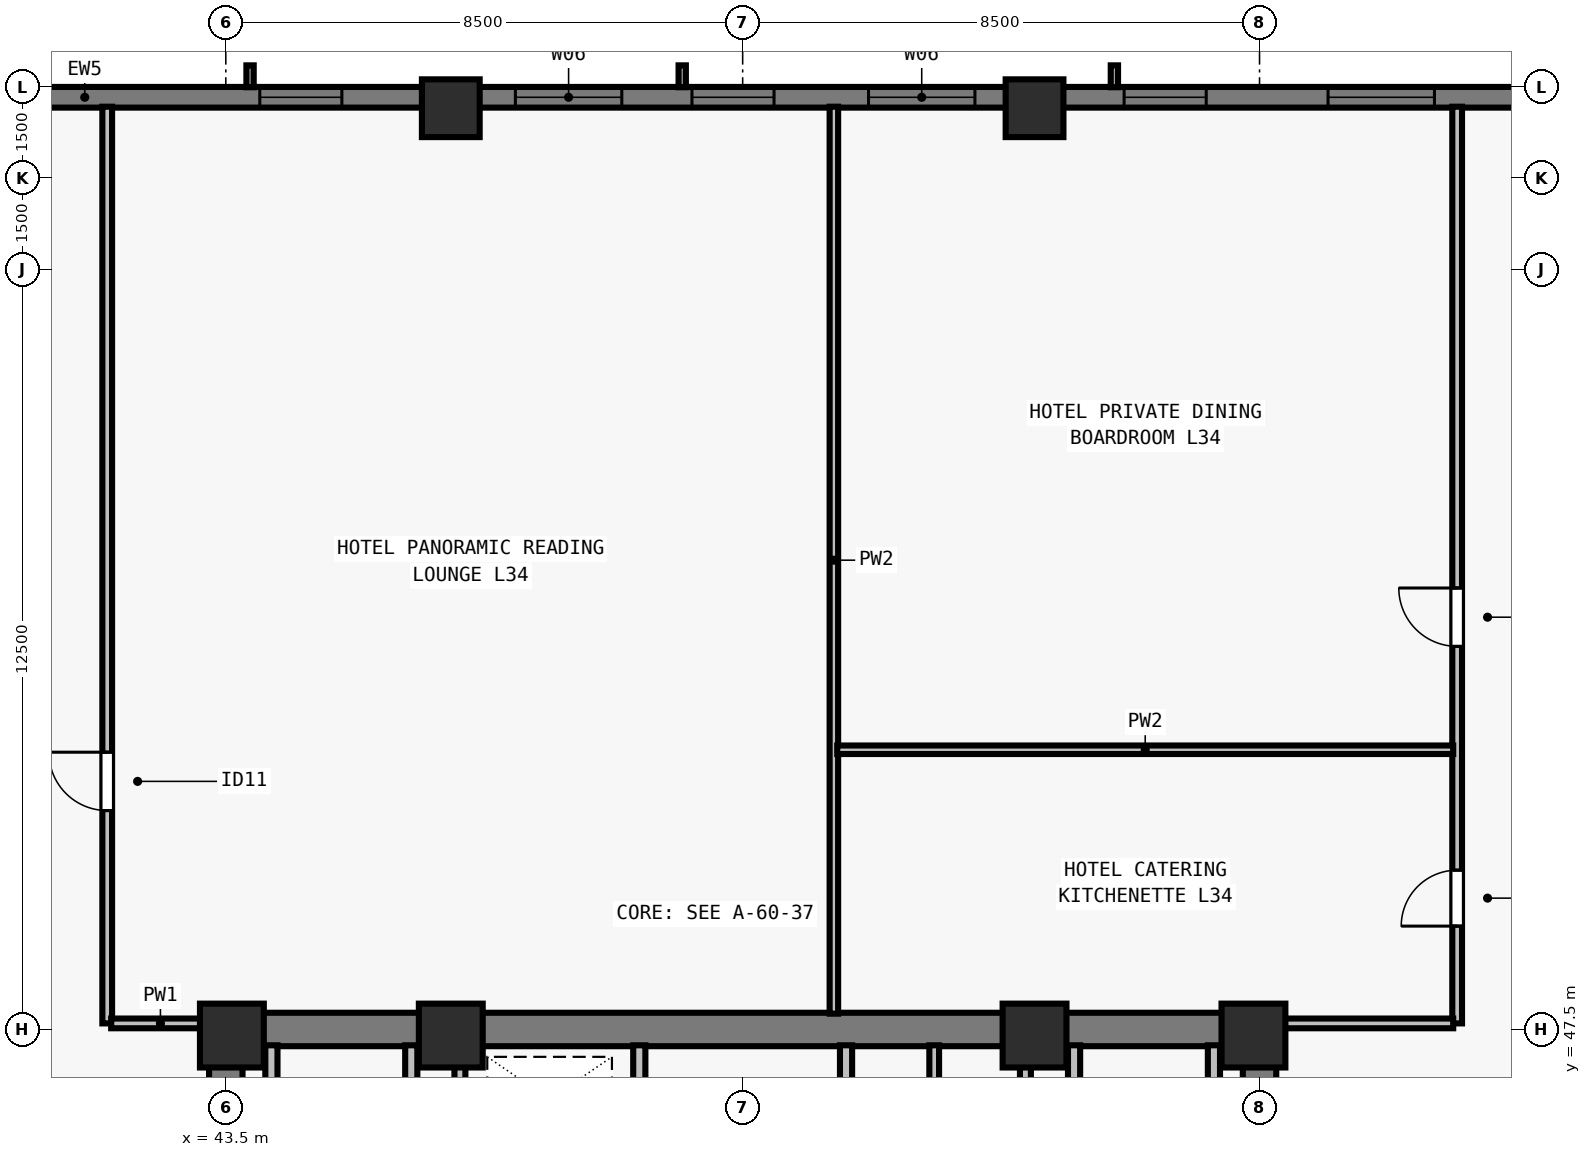
"""IFC4 building model, lengths in metres.
Left out: names, types, materials, properties, quantities, classifications, styles, units other than length and angle.
Written with IfcOpenShell. Run it as: python <this file> out.ifc"""

import sys

from ifc_helpers import new_model, si_unit, direction, frame, frame_2d, origin, origin_2d, place, context, subcontext, project, spatial, rectangle, extrude, element, fill, save


model = new_model("IFC4")
c1 = context("Model", 3, precision=1e-05, world=origin(), true_north=direction((0.0, 1.0)))
c2 = subcontext(c1, "Body", "Model", "MODEL_VIEW")
j1 = project(units=[si_unit("LENGTHUNIT", "METRE"), si_unit("PLANEANGLEUNIT", "RADIAN")], contexts=[c1])
p1 = place(None, origin())
s1 = spatial("IfcSite", under=j1, at=p1, CompositionType="ELEMENT")
p2 = place(p1, origin())
s2 = spatial("IfcBuilding", under=s1, at=p2, CompositionType="ELEMENT")
p3 = place(p2, frame((0.0, 0.0, 127.0)))
s3 = spatial("IfcBuildingStorey", under=s2, at=p3, CompositionType="ELEMENT", Elevation=127.0)
for number, where, z_axis, x_axis in (
    (1, (43.6, 47.4, 0.0), (0.0, 0.0, 1.0), (1.0, 0.0, 0.0)),
    (2, (47.2, 47.4, 0.0), (0.0, 0.0, 1.0), (1.0, 0.0, 0.0)),
    (3, (56.8, 47.4, 0.0), (0.0, 0.0, 1.0), (1.0, 0.0, 0.0)),
    (4, (60.4, 47.4, 0.0), (0.0, 0.0, 1.0), (1.0, 0.0, 0.0)),
):
    element("IfcColumn", number, at=place(p3, frame(where, z_axis=z_axis, x_axis=x_axis)), inside=s3, PredefinedType="COLUMN", context=c2, shape_type="SweptSolid", body=[
        extrude(rectangle(XDim=1.05, YDim=1.05, at=origin_2d()), origin(), (0.0, 0.0, 1.0), 3.5),
    ])
for number, where, z_axis, x_axis in (
    (5, (56.8, 62.65, 0.0), (0.0, 0.0, 1.0), (1.0, 0.0, 0.0)),
    (6, (47.2, 62.65, 0.0), (0.0, 0.0, 1.0), (1.0, 0.0, 0.0)),
):
    element("IfcColumn", number, at=place(p3, frame(where, z_axis=z_axis, x_axis=x_axis)), inside=s3, PredefinedType="COLUMN", context=c2, shape_type="SweptSolid", body=[
        extrude(rectangle(XDim=0.95, YDim=0.95, at=origin_2d()), origin(), (0.0, 0.0, 1.0), 3.5),
    ])
p4 = place(p3, frame((32.0, 62.83, 0.0), z_axis=(0.0, 0.0, 1.0), x_axis=(1.0, 0.0, 0.0)))
e7 = element("IfcWall", 7, at=p4, inside=s3, PredefinedType="SOLIDWALL", context=c2, shape_type="SweptSolid", body=[
    extrude(rectangle(XDim=39.682, YDim=0.34, at=frame_2d((19.841, 0.0))), origin(), (0.0, 0.0, 1.0), 3.28),
])
p5 = place(p4, frame((4.952, 0.0, 0.8)))
e8 = element("IfcOpeningElement", 8, at=p5, cuts=e7, PredefinedType="OPENING", context=c2, shape_type="SweptSolid", body=[
    extrude(rectangle(XDim=1.35, YDim=1.66, at=frame_2d((0.675, 0.83))), frame((0.0, 0.18, 0.0), z_axis=(0.0, -1.0, 0.0), x_axis=(1.0, 0.0, 0.0)), (0.0, 0.0, 1.0), 0.36),
])
p6 = place(p4, frame((12.059, 0.0, 0.8)))
e9 = element("IfcOpeningElement", 9, at=p6, cuts=e7, PredefinedType="OPENING", context=c2, shape_type="SweptSolid", body=[
    extrude(rectangle(XDim=1.35, YDim=1.66, at=frame_2d((0.675, 0.83))), frame((0.0, 0.18, 0.0), z_axis=(0.0, -1.0, 0.0), x_axis=(1.0, 0.0, 0.0)), (0.0, 0.0, 1.0), 0.36),
])
p7 = place(p4, frame((16.262, 0.0, 0.8)))
e10 = element("IfcOpeningElement", 10, at=p7, cuts=e7, PredefinedType="OPENING", context=c2, shape_type="SweptSolid", body=[
    extrude(rectangle(XDim=1.75, YDim=1.66, at=frame_2d((0.875, 0.83))), frame((0.0, 0.18, 0.0), z_axis=(0.0, -1.0, 0.0), x_axis=(1.0, 0.0, 0.0)), (0.0, 0.0, 1.0), 0.36),
])
p8 = place(p4, frame((19.166, 0.0, 0.8)))
e11 = element("IfcOpeningElement", 11, at=p8, cuts=e7, PredefinedType="OPENING", context=c2, shape_type="SweptSolid", body=[
    extrude(rectangle(XDim=1.35, YDim=1.66, at=frame_2d((0.675, 0.83))), frame((0.0, 0.18, 0.0), z_axis=(0.0, -1.0, 0.0), x_axis=(1.0, 0.0, 0.0)), (0.0, 0.0, 1.0), 0.36),
])
p9 = place(p4, frame((22.07, 0.0, 0.8)))
e12 = element("IfcOpeningElement", 12, at=p9, cuts=e7, PredefinedType="OPENING", context=c2, shape_type="SweptSolid", body=[
    extrude(rectangle(XDim=1.75, YDim=1.66, at=frame_2d((0.875, 0.83))), frame((0.0, 0.18, 0.0), z_axis=(0.0, -1.0, 0.0), x_axis=(1.0, 0.0, 0.0)), (0.0, 0.0, 1.0), 0.36),
])
p10 = place(p4, frame((26.273, 0.0, 0.8)))
e13 = element("IfcOpeningElement", 13, at=p10, cuts=e7, PredefinedType="OPENING", context=c2, shape_type="SweptSolid", body=[
    extrude(rectangle(XDim=1.35, YDim=1.66, at=frame_2d((0.675, 0.83))), frame((0.0, 0.18, 0.0), z_axis=(0.0, -1.0, 0.0), x_axis=(1.0, 0.0, 0.0)), (0.0, 0.0, 1.0), 0.36),
])
p11 = place(p4, frame((29.627, 0.0, 0.8)))
e14 = element("IfcOpeningElement", 14, at=p11, cuts=e7, PredefinedType="OPENING", context=c2, shape_type="SweptSolid", body=[
    extrude(rectangle(XDim=1.75, YDim=1.66, at=frame_2d((0.875, 0.83))), frame((0.0, 0.18, 0.0), z_axis=(0.0, -1.0, 0.0), x_axis=(1.0, 0.0, 0.0)), (0.0, 0.0, 1.0), 0.36),
])
p12 = place(p4, frame((34.23, 0.0, 0.8)))
e15 = element("IfcOpeningElement", 15, at=p12, cuts=e7, PredefinedType="OPENING", context=c2, shape_type="SweptSolid", body=[
    extrude(rectangle(XDim=1.35, YDim=1.66, at=frame_2d((0.675, 0.83))), frame((0.0, 0.18, 0.0), z_axis=(0.0, -1.0, 0.0), x_axis=(1.0, 0.0, 0.0)), (0.0, 0.0, 1.0), 0.36),
])
p13 = place(p3, frame((43.225, 47.5, 0.0), z_axis=(0.0, 0.0, 1.0), x_axis=(1.0, 0.0, 0.0)))
e16 = element("IfcWall", 16, at=p13, inside=s3, PredefinedType="SHEAR", context=c2, shape_type="SweptSolid", body=[
    extrude(rectangle(XDim=17.55, YDim=0.55, at=frame_2d((8.775, 0.0))), origin(), (0.0, 0.0, 1.0), 3.28),
])
for number, where, z_axis, x_axis in (
    (17, (43.5, 40.8, 0.0), (0.0, 0.0, 1.0), (0.0, 1.0, 0.0)),
    (18, (60.5, 40.8, 0.0), (0.0, 0.0, 1.0), (0.0, 1.0, 0.0)),
):
    element("IfcWall", number, at=place(p3, frame(where, z_axis=z_axis, x_axis=x_axis)), inside=s3, PredefinedType="SHEAR", context=c2, shape_type="SweptSolid", body=[
        extrude(rectangle(XDim=6.435, YDim=0.55, at=frame_2d((3.218, 0.0))), origin(), (0.0, 0.0, 1.0), 3.28),
    ])
p14 = place(p3, frame((50.3, 40.585, 0.0), z_axis=(0.0, 0.0, 1.0), x_axis=(0.0, 1.0, 0.0)))
e19 = element("IfcWall", 19, at=p14, inside=s3, PredefinedType="SOLIDWALL", context=c2, shape_type="SweptSolid", body=[
    extrude(rectangle(XDim=6.655, YDim=0.2, at=frame_2d((3.328, 0.0))), origin(), (0.0, 0.0, 1.0), 3.28),
])
p15 = place(p14, frame((5.065, 0.0, 0.0)))
e20 = element("IfcOpeningElement", 20, at=p15, cuts=e19, PredefinedType="OPENING", context=c2, shape_type="SweptSolid", body=[
    extrude(rectangle(XDim=0.8, YDim=2.08, at=frame_2d((0.4, 1.04))), frame((0.0, 0.11, 0.0), z_axis=(0.0, -1.0, 0.0), x_axis=(1.0, 0.0, 0.0)), (0.0, 0.0, 1.0), 0.22),
])
p16 = place(p3, frame((53.7, 40.585, 0.0), z_axis=(0.0, 0.0, 1.0), x_axis=(0.0, 1.0, 0.0)))
e21 = element("IfcWall", 21, at=p16, inside=s3, PredefinedType="SOLIDWALL", context=c2, shape_type="SweptSolid", body=[
    extrude(rectangle(XDim=6.655, YDim=0.2, at=frame_2d((3.328, 0.0))), origin(), (0.0, 0.0, 1.0), 3.28),
])
p17 = place(p16, frame((0.195, 0.0, 0.0)))
e22 = element("IfcOpeningElement", 22, at=p17, cuts=e21, PredefinedType="OPENING", context=c2, shape_type="SweptSolid", body=[
    extrude(rectangle(XDim=0.8, YDim=2.08, at=frame_2d((0.4, 1.04))), frame((0.0, 0.11, 0.0), z_axis=(0.0, -1.0, 0.0), x_axis=(1.0, 0.0, 0.0)), (0.0, 0.0, 1.0), 0.22),
])
p18 = place(p16, frame((4.265, 0.0, 0.0)))
e23 = element("IfcOpeningElement", 23, at=p18, cuts=e21, PredefinedType="OPENING", context=c2, shape_type="SweptSolid", body=[
    extrude(rectangle(XDim=0.95, YDim=2.12, at=frame_2d((0.475, 1.06))), frame((0.0, 0.11, 0.0), z_axis=(0.0, -1.0, 0.0), x_axis=(1.0, 0.0, 0.0)), (0.0, 0.0, 1.0), 0.22),
])
for number, where, z_axis, x_axis in (
    (24, (46.55, 43.735, 0.0), (0.0, 0.0, 1.0), (0.0, 1.0, 0.0)),
    (25, (44.25, 43.735, 0.0), (0.0, 0.0, 1.0), (0.0, 1.0, 0.0)),
    (26, (57.45, 43.735, 0.0), (0.0, 0.0, 1.0), (0.0, 1.0, 0.0)),
    (27, (59.75, 43.735, 0.0), (0.0, 0.0, 1.0), (0.0, 1.0, 0.0)),
):
    element("IfcWall", number, at=place(p3, frame(where, z_axis=z_axis, x_axis=x_axis)), inside=s3, PredefinedType="SOLIDWALL", context=c2, shape_type="SweptSolid", body=[
        extrude(rectangle(XDim=3.505, YDim=0.2, at=frame_2d((1.752, 0.0))), origin(), (0.0, 0.0, 1.0), 3.28),
    ])
for number, where, z_axis, x_axis in (
    (28, (47.35, 43.735, 0.0), (0.0, 0.0, 1.0), (0.0, 1.0, 0.0)),
    (29, (56.65, 43.735, 0.0), (0.0, 0.0, 1.0), (0.0, 1.0, 0.0)),
):
    element("IfcWall", number, at=place(p3, frame(where, z_axis=z_axis, x_axis=x_axis)), inside=s3, PredefinedType="SOLIDWALL", context=c2, shape_type="SweptSolid", body=[
        extrude(rectangle(XDim=3.505, YDim=0.18, at=frame_2d((1.752, 0.0))), origin(), (0.0, 0.0, 1.0), 3.28),
    ])
p19 = place(p3, frame((55.15, 44.195, 0.0), z_axis=(0.0, 0.0, 1.0), x_axis=(0.0, 1.0, 0.0)))
e30 = element("IfcWall", 30, at=p19, inside=s3, PredefinedType="PARTITIONING", context=c2, shape_type="SweptSolid", body=[
    extrude(rectangle(XDim=3.045, YDim=0.16, at=frame_2d((1.522, 0.0))), origin(), (0.0, 0.0, 1.0), 3.28),
])
p20 = place(p19, frame((1.025, 0.0, 0.0)))
e31 = element("IfcOpeningElement", 31, at=p20, cuts=e30, PredefinedType="OPENING", context=c2, shape_type="SweptSolid", body=[
    extrude(rectangle(XDim=0.8, YDim=2.1, at=frame_2d((0.4, 1.05))), frame((0.0, 0.09, 0.0), z_axis=(0.0, -1.0, 0.0), x_axis=(1.0, 0.0, 0.0)), (0.0, 0.0, 1.0), 0.18),
])
p21 = place(p3, frame((41.55, 47.6, 0.0), z_axis=(0.0, 0.0, 1.0), x_axis=(0.0, 1.0, 0.0)))
e32 = element("IfcWall", 32, at=p21, inside=s3, PredefinedType="PARTITIONING", context=c2, shape_type="SweptSolid", body=[
    extrude(rectangle(XDim=15.075, YDim=0.16, at=frame_2d((7.538, 0.0))), origin(), (0.0, 0.0, 1.0), 2.555),
])
p22 = place(p21, frame((3.5, 0.0, 0.0)))
e33 = element("IfcOpeningElement", 33, at=p22, cuts=e32, PredefinedType="OPENING", context=c2, shape_type="SweptSolid", body=[
    extrude(rectangle(XDim=0.96, YDim=2.12, at=frame_2d((0.48, 1.06))), frame((0.0, 0.09, 0.0), z_axis=(0.0, -1.0, 0.0), x_axis=(1.0, 0.0, 0.0)), (0.0, 0.0, 1.0), 0.18),
])
p23 = place(p3, frame((41.615, 47.6, 0.0), z_axis=(0.0, 0.0, 1.0), x_axis=(1.0, 0.0, 0.0)))
e34 = element("IfcWall", 34, at=p23, inside=s3, PredefinedType="PARTITIONING", context=c2, shape_type="SweptSolid", body=[
    extrude(rectangle(XDim=1.62, YDim=0.16, at=frame_2d((0.81, 0.0))), origin(), (0.0, 0.0, 1.0), 3.28),
])
p24 = place(p3, frame((63.75, 47.6, 0.0), z_axis=(0.0, 0.0, 1.0), x_axis=(0.0, 1.0, 0.0)))
e35 = element("IfcWall", 35, at=p24, inside=s3, PredefinedType="PARTITIONING", context=c2, shape_type="SweptSolid", body=[
    extrude(rectangle(XDim=15.075, YDim=0.16, at=frame_2d((7.538, 0.0))), origin(), (0.0, 0.0, 1.0), 2.555),
])
p25 = place(p24, frame((1.6, 0.0, 0.0)))
e36 = element("IfcOpeningElement", 36, at=p25, cuts=e35, PredefinedType="OPENING", context=c2, shape_type="SweptSolid", body=[
    extrude(rectangle(XDim=0.92, YDim=2.12, at=frame_2d((0.46, 1.06))), frame((0.0, 0.09, 0.0), z_axis=(0.0, -1.0, 0.0), x_axis=(1.0, 0.0, 0.0)), (0.0, 0.0, 1.0), 0.18),
])
p26 = place(p24, frame((6.2, 0.0, 0.0)))
e37 = element("IfcOpeningElement", 37, at=p26, cuts=e35, PredefinedType="OPENING", context=c2, shape_type="SweptSolid", body=[
    extrude(rectangle(XDim=0.96, YDim=2.12, at=frame_2d((0.48, 1.06))), frame((0.0, 0.09, 0.0), z_axis=(0.0, -1.0, 0.0), x_axis=(1.0, 0.0, 0.0)), (0.0, 0.0, 1.0), 0.18),
])
p27 = place(p3, frame((60.765, 47.6, 0.0), z_axis=(0.0, 0.0, 1.0), x_axis=(1.0, 0.0, 0.0)))
e38 = element("IfcWall", 38, at=p27, inside=s3, PredefinedType="PARTITIONING", context=c2, shape_type="SweptSolid", body=[
    extrude(rectangle(XDim=2.92, YDim=0.16, at=frame_2d((1.46, 0.0))), origin(), (0.0, 0.0, 1.0), 3.28),
])
p28 = place(p3, frame((53.5, 47.76, 0.0), z_axis=(0.0, 0.0, 1.0), x_axis=(0.0, 1.0, 0.0)))
e39 = element("IfcWall", 39, at=p28, inside=s3, PredefinedType="PARTITIONING", context=c2, shape_type="SweptSolid", body=[
    extrude(rectangle(XDim=14.915, YDim=0.14, at=frame_2d((7.458, 0.0))), origin(), (0.0, 0.0, 1.0), 2.896),
])
p29 = place(p3, frame((53.555, 52.1, 0.0), z_axis=(0.0, 0.0, 1.0), x_axis=(1.0, 0.0, 0.0)))
e40 = element("IfcWall", 40, at=p29, inside=s3, PredefinedType="PARTITIONING", context=c2, shape_type="SweptSolid", body=[
    extrude(rectangle(XDim=10.13, YDim=0.14, at=frame_2d((5.065, 0.0))), origin(), (0.0, 0.0, 1.0), 3.28),
])
p30 = place(p6, origin())
e41 = element("IfcWindow", 41, at=p30, inside=s3, PartitioningType="SINGLE_PANEL", PredefinedType="WINDOW", context=c2, shape_type="SweptSolid", body=[
    extrude(rectangle(XDim=1.35, YDim=1.66, at=frame_2d((0.675, 0.83))), frame((0.0, -0.05, 0.0), z_axis=(0.0, -1.0, 0.0), x_axis=(1.0, 0.0, 0.0)), (0.0, 0.0, 1.0), 0.06),
])
fill(e9, e41)
p31 = place(p7, origin())
e42 = element("IfcWindow", 42, at=p31, inside=s3, PartitioningType="SINGLE_PANEL", PredefinedType="WINDOW", context=c2, shape_type="SweptSolid", body=[
    extrude(rectangle(XDim=1.75, YDim=1.66, at=frame_2d((0.875, 0.83))), frame((0.0, -0.05, 0.0), z_axis=(0.0, -1.0, 0.0), x_axis=(1.0, 0.0, 0.0)), (0.0, 0.0, 1.0), 0.06),
])
fill(e10, e42)
p32 = place(p8, origin())
e43 = element("IfcWindow", 43, at=p32, inside=s3, PartitioningType="SINGLE_PANEL", PredefinedType="WINDOW", context=c2, shape_type="SweptSolid", body=[
    extrude(rectangle(XDim=1.35, YDim=1.66, at=frame_2d((0.675, 0.83))), frame((0.0, -0.05, 0.0), z_axis=(0.0, -1.0, 0.0), x_axis=(1.0, 0.0, 0.0)), (0.0, 0.0, 1.0), 0.06),
])
fill(e11, e43)
p33 = place(p9, origin())
e44 = element("IfcWindow", 44, at=p33, inside=s3, PartitioningType="SINGLE_PANEL", PredefinedType="WINDOW", context=c2, shape_type="SweptSolid", body=[
    extrude(rectangle(XDim=1.75, YDim=1.66, at=frame_2d((0.875, 0.83))), frame((0.0, -0.05, 0.0), z_axis=(0.0, -1.0, 0.0), x_axis=(1.0, 0.0, 0.0)), (0.0, 0.0, 1.0), 0.06),
])
fill(e12, e44)
p34 = place(p10, origin())
e45 = element("IfcWindow", 45, at=p34, inside=s3, PartitioningType="SINGLE_PANEL", PredefinedType="WINDOW", context=c2, shape_type="SweptSolid", body=[
    extrude(rectangle(XDim=1.35, YDim=1.66, at=frame_2d((0.675, 0.83))), frame((0.0, -0.05, 0.0), z_axis=(0.0, -1.0, 0.0), x_axis=(1.0, 0.0, 0.0)), (0.0, 0.0, 1.0), 0.06),
])
fill(e13, e45)
p35 = place(p11, origin())
e46 = element("IfcWindow", 46, at=p35, inside=s3, PartitioningType="SINGLE_PANEL", PredefinedType="WINDOW", context=c2, shape_type="SweptSolid", body=[
    extrude(rectangle(XDim=1.75, YDim=1.66, at=frame_2d((0.875, 0.83))), frame((0.0, -0.05, 0.0), z_axis=(0.0, -1.0, 0.0), x_axis=(1.0, 0.0, 0.0)), (0.0, 0.0, 1.0), 0.06),
])
fill(e14, e46)
p36 = place(p22, origin())
e47 = element("IfcDoor", 47, at=p36, inside=s3, OperationType="SINGLE_SWING_RIGHT", PredefinedType="DOOR", context=c2, shape_type="SweptSolid", body=[
    extrude(rectangle(XDim=0.96, YDim=2.12, at=frame_2d((0.48, 1.06))), frame((0.0, 0.025, 0.0), z_axis=(0.0, -1.0, 0.0), x_axis=(1.0, 0.0, 0.0)), (0.0, 0.0, 1.0), 0.05),
])
fill(e33, e47)
p37 = place(p25, origin())
e48 = element("IfcDoor", 48, at=p37, inside=s3, OperationType="SINGLE_SWING_LEFT", PredefinedType="DOOR", context=c2, shape_type="SweptSolid", body=[
    extrude(rectangle(XDim=0.92, YDim=2.12, at=frame_2d((0.46, 1.06))), frame((0.0, 0.025, 0.0), z_axis=(0.0, -1.0, 0.0), x_axis=(1.0, 0.0, 0.0)), (0.0, 0.0, 1.0), 0.05),
])
fill(e36, e48)
p38 = place(p26, origin())
e49 = element("IfcDoor", 49, at=p38, inside=s3, OperationType="SINGLE_SWING_RIGHT", PredefinedType="DOOR", context=c2, shape_type="SweptSolid", body=[
    extrude(rectangle(XDim=0.96, YDim=2.12, at=frame_2d((0.48, 1.06))), frame((0.0, 0.025, 0.0), z_axis=(0.0, -1.0, 0.0), x_axis=(1.0, 0.0, 0.0)), (0.0, 0.0, 1.0), 0.05),
])
fill(e37, e49)
save(model, sys.argv[1])
